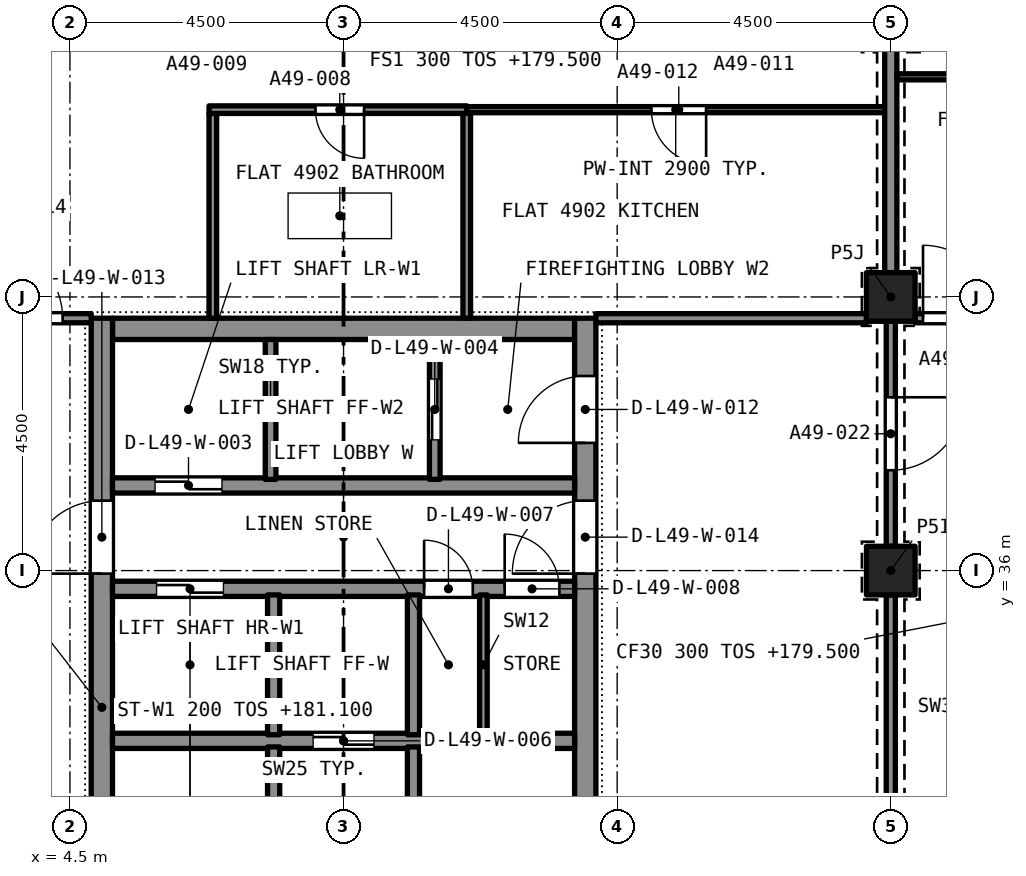
"""IFC4 building model, lengths in metres.
Left out: names, types, materials, properties, quantities, classifications, styles, units other than length and angle.
Written with IfcOpenShell. Run it as: python <this file> out.ifc"""

import sys

from ifc_helpers import new_model, si_unit, direction, frame, frame_2d, origin, origin_2d, place, context, subcontext, project, spatial, rectangle, extrude, element, fill, save


model = new_model("IFC4")
c1 = context("Model", 3, precision=1e-05, world=origin(), true_north=direction((0.0, 1.0)))
c2 = subcontext(c1, "Body", "Model", "MODEL_VIEW")
j1 = project(units=[si_unit("LENGTHUNIT", "METRE"), si_unit("PLANEANGLEUNIT", "RADIAN")], contexts=[c1])
p1 = place(None, origin())
s1 = spatial("IfcSite", under=j1, at=p1, CompositionType="ELEMENT")
p2 = place(p1, origin())
s2 = spatial("IfcBuilding", under=s1, at=p2, CompositionType="ELEMENT")
p3 = place(p2, frame((0.0, 0.0, 179.5)))
s3 = spatial("IfcBuildingStorey", under=s2, at=p3, CompositionType="ELEMENT", Elevation=179.5)
for number, where, z_axis, x_axis in (
    (1, (18.0, 36.0, 0.0), (0.0, 0.0, 1.0), (1.0, 0.0, 0.0)),
    (2, (18.0, 40.5, 0.0), (0.0, 0.0, 1.0), (1.0, 0.0, 0.0)),
):
    element("IfcColumn", number, at=place(p3, frame(where, z_axis=z_axis, x_axis=x_axis)), inside=s3, PredefinedType="COLUMN", context=c2, shape_type="SweptSolid", body=[
        extrude(rectangle(XDim=0.8, YDim=0.8, at=origin_2d()), origin(), (0.0, 0.0, 1.0), 3.2),
    ])
p4 = place(p3, frame((5.2, 39.975, 0.0), z_axis=(0.0, 0.0, 1.0), x_axis=(1.0, 0.0, 0.0)))
e3 = element("IfcWall", 3, at=p4, inside=s3, PredefinedType="SOLIDWALL", context=c2, shape_type="SweptSolid", body=[
    extrude(rectangle(XDim=7.6, YDim=0.35, at=frame_2d((3.8, 0.0))), origin(), (0.0, 0.0, 1.0), 3.2),
])
p5 = place(p3, frame((5.025, 27.35, 0.0), z_axis=(0.0, 0.0, 1.0), x_axis=(0.0, 1.0, 0.0)))
e4 = element("IfcWall", 4, at=p5, inside=s3, PredefinedType="SOLIDWALL", context=c2, shape_type="SweptSolid", body=[
    extrude(rectangle(XDim=12.8, YDim=0.35, at=frame_2d((6.4, 0.0))), origin(), (0.0, 0.0, 1.0), 3.2),
])
p6 = place(p5, frame((8.6, 0.0, 0.0)))
e5 = element("IfcOpeningElement", 5, at=p6, cuts=e4, PredefinedType="OPENING", context=c2, shape_type="SweptSolid", body=[
    extrude(rectangle(XDim=1.2, YDim=2.1, at=frame_2d((0.6, 1.05))), frame((0.0, 0.185, 0.0), z_axis=(0.0, -1.0, 0.0), x_axis=(1.0, 0.0, 0.0)), (0.0, 0.0, 1.0), 0.37),
])
p7 = place(p3, frame((12.975, 27.35, 0.0), z_axis=(0.0, 0.0, 1.0), x_axis=(0.0, 1.0, 0.0)))
e6 = element("IfcWall", 6, at=p7, inside=s3, PredefinedType="SOLIDWALL", context=c2, shape_type="SweptSolid", body=[
    extrude(rectangle(XDim=12.8, YDim=0.35, at=frame_2d((6.4, 0.0))), origin(), (0.0, 0.0, 1.0), 3.2),
])
p8 = place(p7, frame((10.75, 0.0, 0.0)))
e7 = element("IfcOpeningElement", 7, at=p8, cuts=e6, PredefinedType="OPENING", context=c2, shape_type="SweptSolid", body=[
    extrude(rectangle(XDim=1.1, YDim=2.1, at=frame_2d((0.55, 1.05))), frame((0.0, 0.185, 0.0), z_axis=(0.0, -1.0, 0.0), x_axis=(1.0, 0.0, 0.0)), (0.0, 0.0, 1.0), 0.37),
])
p9 = place(p7, frame((8.6, 0.0, 0.0)))
e8 = element("IfcOpeningElement", 8, at=p9, cuts=e6, PredefinedType="OPENING", context=c2, shape_type="SweptSolid", body=[
    extrude(rectangle(XDim=1.2, YDim=2.1, at=frame_2d((0.6, 1.05))), frame((0.0, 0.185, 0.0), z_axis=(0.0, -1.0, 0.0), x_axis=(1.0, 0.0, 0.0)), (0.0, 0.0, 1.0), 0.37),
])
p10 = place(p3, frame((6.85, 40.15, 0.0), z_axis=(0.0, 0.0, 1.0), x_axis=(0.0, 1.0, 0.0)))
e9 = element("IfcWall", 9, at=p10, inside=s3, PredefinedType="PARTITIONING", context=c2, shape_type="SweptSolid", body=[
    extrude(rectangle(XDim=3.368, YDim=0.125, at=frame_2d((1.684, 0.0))), origin(), (0.0, 0.0, 1.0), 2.9),
])
p11 = place(p3, frame((11.026, 43.58, 0.0), z_axis=(0.0, 0.0, 1.0), x_axis=(-1.0, 0.0, 0.0)))
e10 = element("IfcWall", 10, at=p11, inside=s3, PredefinedType="PARTITIONING", context=c2, shape_type="SweptSolid", body=[
    extrude(rectangle(XDim=4.239, YDim=0.125, at=frame_2d((2.119, 0.0))), origin(), (0.0, 0.0, 1.0), 2.9),
])
p12 = place(p11, frame((1.688, 0.0, 0.0)))
e11 = element("IfcOpeningElement", 11, at=p12, cuts=e10, PredefinedType="OPENING", context=c2, shape_type="SweptSolid", body=[
    extrude(rectangle(XDim=0.8, YDim=2.1, at=frame_2d((0.4, 1.05))), frame((0.0, 0.073, 0.0), z_axis=(0.0, -1.0, 0.0), x_axis=(1.0, 0.0, 0.0)), (0.0, 0.0, 1.0), 0.145),
])
p13 = place(p3, frame((11.026, 40.15, 0.0), z_axis=(0.0, 0.0, 1.0), x_axis=(0.0, 1.0, 0.0)))
e12 = element("IfcWall", 12, at=p13, inside=s3, PredefinedType="PARTITIONING", context=c2, shape_type="SweptSolid", body=[
    extrude(rectangle(XDim=3.368, YDim=0.125, at=frame_2d((1.684, 0.0))), origin(), (0.0, 0.0, 1.0), 2.9),
])
p14 = place(p3, frame((17.9, 43.58, 0.0), z_axis=(0.0, 0.0, 1.0), x_axis=(-1.0, 0.0, 0.0)))
e13 = element("IfcWall", 13, at=p14, inside=s3, PredefinedType="PARTITIONING", context=c2, shape_type="SweptSolid", body=[
    extrude(rectangle(XDim=6.874, YDim=0.1, at=frame_2d((3.437, 0.0))), origin(), (0.0, 0.0, 1.0), 2.9),
])
p15 = place(p14, frame((2.937, 0.0, 0.0)))
e14 = element("IfcOpeningElement", 14, at=p15, cuts=e13, PredefinedType="OPENING", context=c2, shape_type="SweptSolid", body=[
    extrude(rectangle(XDim=0.9, YDim=2.1, at=frame_2d((0.45, 1.05))), frame((0.0, 0.06, 0.0), z_axis=(0.0, -1.0, 0.0), x_axis=(1.0, 0.0, 0.0)), (0.0, 0.0, 1.0), 0.12),
])
p16 = place(p3, frame((3.05, 40.15, 0.0), z_axis=(0.0, 0.0, 1.0), x_axis=(1.0, 0.0, 0.0)))
e15 = element("IfcWall", 15, at=p16, inside=s3, PredefinedType="PARTITIONING", context=c2, shape_type="SweptSolid", body=[
    extrude(rectangle(XDim=1.8, YDim=0.15, at=frame_2d((0.9, 0.0))), origin(), (0.0, 0.0, 1.0), 2.9),
])
p17 = place(p16, frame((0.13, 0.0, 0.0)))
e16 = element("IfcOpeningElement", 16, at=p17, cuts=e15, PredefinedType="OPENING", context=c2, shape_type="SweptSolid", body=[
    extrude(rectangle(XDim=1.2, YDim=2.4, at=frame_2d((0.6, 1.2))), frame((0.0, 0.085, 0.0), z_axis=(0.0, -1.0, 0.0), x_axis=(1.0, 0.0, 0.0)), (0.0, 0.0, 1.0), 0.17),
])
p18 = place(p3, frame((18.0, 40.9, 0.0), z_axis=(0.0, 0.0, 1.0), x_axis=(0.0, 1.0, 0.0)))
e17 = element("IfcWall", 17, at=p18, inside=s3, PredefinedType="PARTITIONING", context=c2, shape_type="SweptSolid", body=[
    extrude(rectangle(XDim=3.7, YDim=0.2, at=frame_2d((1.85, 0.0))), origin(), (0.0, 0.0, 1.0), 2.38),
])
p19 = place(p3, frame((13.15, 40.15, 0.0), z_axis=(0.0, 0.0, 1.0), x_axis=(1.0, 0.0, 0.0)))
e18 = element("IfcWall", 18, at=p19, inside=s3, PredefinedType="PARTITIONING", context=c2, shape_type="SweptSolid", body=[
    extrude(rectangle(XDim=4.45, YDim=0.15, at=frame_2d((2.225, 0.0))), origin(), (0.0, 0.0, 1.0), 2.9),
])
p20 = place(p3, frame((18.1, 44.12, 0.0), z_axis=(0.0, 0.0, 1.0), x_axis=(1.0, 0.0, 0.0)))
e19 = element("IfcWall", 19, at=p20, inside=s3, PredefinedType="PARTITIONING", context=c2, shape_type="SweptSolid", body=[
    extrude(rectangle(XDim=4.4, YDim=0.1, at=frame_2d((2.2, 0.0))), origin(), (0.0, 0.0, 1.0), 2.75),
])
p21 = place(p20, frame((1.7, 0.0, 0.0)))
e20 = element("IfcOpeningElement", 20, at=p21, cuts=e19, PredefinedType="OPENING", context=c2, shape_type="SweptSolid", body=[
    extrude(rectangle(XDim=0.9, YDim=2.1, at=frame_2d((0.45, 1.05))), frame((0.0, 0.06, 0.0), z_axis=(0.0, -1.0, 0.0), x_axis=(1.0, 0.0, 0.0)), (0.0, 0.0, 1.0), 0.12),
])
p22 = place(p3, frame((18.4, 40.15, 0.0), z_axis=(0.0, 0.0, 1.0), x_axis=(1.0, 0.0, 0.0)))
e21 = element("IfcWall", 21, at=p22, inside=s3, PredefinedType="PARTITIONING", context=c2, shape_type="SweptSolid", body=[
    extrude(rectangle(XDim=1.95, YDim=0.15, at=frame_2d((0.975, 0.0))), origin(), (0.0, 0.0, 1.0), 2.75),
])
p23 = place(p22, frame((0.13, 0.0, 0.0)))
e22 = element("IfcOpeningElement", 22, at=p23, cuts=e21, PredefinedType="OPENING", context=c2, shape_type="SweptSolid", body=[
    extrude(rectangle(XDim=1.2, YDim=2.4, at=frame_2d((0.6, 1.2))), frame((0.0, 0.085, 0.0), z_axis=(0.0, -1.0, 0.0), x_axis=(1.0, 0.0, 0.0)), (0.0, 0.0, 1.0), 0.17),
])
p24 = place(p3, frame((18.0, 31.9, 0.0), z_axis=(0.0, 0.0, 1.0), x_axis=(0.0, 1.0, 0.0)))
e23 = element("IfcWall", 23, at=p24, inside=s3, PredefinedType="PARTITIONING", context=c2, shape_type="SweptSolid", body=[
    extrude(rectangle(XDim=3.7, YDim=0.15, at=frame_2d((1.85, 0.0))), origin(), (0.0, 0.0, 1.0), 2.38),
])
p25 = place(p3, frame((18.0, 40.1, 0.0), z_axis=(0.0, 0.0, 1.0), x_axis=(0.0, -1.0, 0.0)))
e24 = element("IfcWall", 24, at=p25, inside=s3, PredefinedType="PARTITIONING", context=c2, shape_type="SweptSolid", body=[
    extrude(rectangle(XDim=3.7, YDim=0.15, at=frame_2d((1.85, 0.0))), origin(), (0.0, 0.0, 1.0), 2.38),
])
p26 = place(p25, frame((1.25, 0.0, 0.0)))
e25 = element("IfcOpeningElement", 25, at=p26, cuts=e24, PredefinedType="OPENING", context=c2, shape_type="SweptSolid", body=[
    extrude(rectangle(XDim=1.2, YDim=2.1, at=frame_2d((0.6, 1.05))), frame((0.0, 0.085, 0.0), z_axis=(0.0, -1.0, 0.0), x_axis=(1.0, 0.0, 0.0)), (0.0, 0.0, 1.0), 0.17),
])
p27 = place(p3, frame((5.2, 33.2, 0.0), z_axis=(0.0, 0.0, 1.0), x_axis=(1.0, 0.0, 0.0)))
e26 = element("IfcWall", 26, at=p27, inside=s3, PredefinedType="SOLIDWALL", context=c2, shape_type="SweptSolid", body=[
    extrude(rectangle(XDim=7.6, YDim=0.25, at=frame_2d((3.8, 0.0))), origin(), (0.0, 0.0, 1.0), 2.9),
])
p28 = place(p27, frame((3.3, 0.0, 0.0)))
e27 = element("IfcOpeningElement", 27, at=p28, cuts=e26, PredefinedType="OPENING", context=c2, shape_type="SweptSolid", body=[
    extrude(rectangle(XDim=1.0, YDim=2.1, at=frame_2d((0.5, 1.05))), frame((0.0, 0.135, 0.0), z_axis=(0.0, -1.0, 0.0), x_axis=(1.0, 0.0, 0.0)), (0.0, 0.0, 1.0), 0.27),
])
p29 = place(p3, frame((5.2, 35.7, 0.0), z_axis=(0.0, 0.0, 1.0), x_axis=(1.0, 0.0, 0.0)))
e28 = element("IfcWall", 28, at=p29, inside=s3, PredefinedType="SOLIDWALL", context=c2, shape_type="SweptSolid", body=[
    extrude(rectangle(XDim=7.6, YDim=0.25, at=frame_2d((3.8, 0.0))), origin(), (0.0, 0.0, 1.0), 2.9),
])
p30 = place(p29, frame((0.725, 0.0, 0.0)))
e29 = element("IfcOpeningElement", 29, at=p30, cuts=e28, PredefinedType="OPENING", context=c2, shape_type="SweptSolid", body=[
    extrude(rectangle(XDim=1.1, YDim=2.4, at=frame_2d((0.55, 1.2))), frame((0.0, 0.135, 0.0), z_axis=(0.0, -1.0, 0.0), x_axis=(1.0, 0.0, 0.0)), (0.0, 0.0, 1.0), 0.27),
])
p31 = place(p29, frame((5.125, 0.0, 0.0)))
e30 = element("IfcOpeningElement", 30, at=p31, cuts=e28, PredefinedType="OPENING", context=c2, shape_type="SweptSolid", body=[
    extrude(rectangle(XDim=0.8, YDim=2.1, at=frame_2d((0.4, 1.05))), frame((0.0, 0.135, 0.0), z_axis=(0.0, -1.0, 0.0), x_axis=(1.0, 0.0, 0.0)), (0.0, 0.0, 1.0), 0.27),
])
p32 = place(p29, frame((6.45, 0.0, 0.0)))
e31 = element("IfcOpeningElement", 31, at=p32, cuts=e28, PredefinedType="OPENING", context=c2, shape_type="SweptSolid", body=[
    extrude(rectangle(XDim=0.9, YDim=2.1, at=frame_2d((0.45, 1.05))), frame((0.0, 0.135, 0.0), z_axis=(0.0, -1.0, 0.0), x_axis=(1.0, 0.0, 0.0)), (0.0, 0.0, 1.0), 0.27),
])
p33 = place(p3, frame((5.2, 37.4, 0.0), z_axis=(0.0, 0.0, 1.0), x_axis=(1.0, 0.0, 0.0)))
e32 = element("IfcWall", 32, at=p33, inside=s3, PredefinedType="SOLIDWALL", context=c2, shape_type="SweptSolid", body=[
    extrude(rectangle(XDim=7.6, YDim=0.25, at=frame_2d((3.8, 0.0))), origin(), (0.0, 0.0, 1.0), 2.9),
])
p34 = place(p33, frame((0.7, 0.0, 0.0)))
e33 = element("IfcOpeningElement", 33, at=p34, cuts=e32, PredefinedType="OPENING", context=c2, shape_type="SweptSolid", body=[
    extrude(rectangle(XDim=1.1, YDim=2.4, at=frame_2d((0.55, 1.2))), frame((0.0, 0.135, 0.0), z_axis=(0.0, -1.0, 0.0), x_axis=(1.0, 0.0, 0.0)), (0.0, 0.0, 1.0), 0.27),
])
p35 = place(p3, frame((7.85, 27.7, 0.0), z_axis=(0.0, 0.0, 1.0), x_axis=(0.0, 1.0, 0.0)))
e34 = element("IfcWall", 34, at=p35, inside=s3, PredefinedType="SOLIDWALL", context=c2, shape_type="SweptSolid", body=[
    extrude(rectangle(XDim=5.4, YDim=0.2, at=frame_2d((2.7, 0.0))), origin(), (0.0, 0.0, 1.0), 2.9),
])
p36 = place(p35, frame((0.2, 0.0, 0.0)))
e35 = element("IfcOpeningElement", 35, at=p36, cuts=e34, PredefinedType="OPENING", context=c2, shape_type="SweptSolid", body=[
    extrude(rectangle(XDim=0.9, YDim=2.1, at=frame_2d((0.45, 1.05))), frame((0.0, 0.11, 0.0), z_axis=(0.0, -1.0, 0.0), x_axis=(1.0, 0.0, 0.0)), (0.0, 0.0, 1.0), 0.22),
])
p37 = place(p3, frame((10.15, 27.7, 0.0), z_axis=(0.0, 0.0, 1.0), x_axis=(0.0, 1.0, 0.0)))
e36 = element("IfcWall", 36, at=p37, inside=s3, PredefinedType="SOLIDWALL", context=c2, shape_type="SweptSolid", body=[
    extrude(rectangle(XDim=5.4, YDim=0.2, at=frame_2d((2.7, 0.0))), origin(), (0.0, 0.0, 1.0), 2.9),
])
p38 = place(p37, frame((0.2, 0.0, 0.0)))
e37 = element("IfcOpeningElement", 37, at=p38, cuts=e36, PredefinedType="OPENING", context=c2, shape_type="SweptSolid", body=[
    extrude(rectangle(XDim=0.9, YDim=2.1, at=frame_2d((0.45, 1.05))), frame((0.0, 0.11, 0.0), z_axis=(0.0, -1.0, 0.0), x_axis=(1.0, 0.0, 0.0)), (0.0, 0.0, 1.0), 0.22),
])
for number, where, z_axis, x_axis in (
    (38, (7.85, 33.3, 0.0), (0.0, 0.0, 1.0), (0.0, 1.0, 0.0)),
    (39, (10.15, 33.3, 0.0), (0.0, 0.0, 1.0), (0.0, 1.0, 0.0)),
):
    element("IfcWall", number, at=place(p3, frame(where, z_axis=z_axis, x_axis=x_axis)), inside=s3, PredefinedType="SOLIDWALL", context=c2, shape_type="SweptSolid", body=[
        extrude(rectangle(XDim=2.3, YDim=0.2, at=frame_2d((1.15, 0.0))), origin(), (0.0, 0.0, 1.0), 2.9),
    ])
p39 = place(p3, frame((7.8, 37.5, 0.0), z_axis=(0.0, 0.0, 1.0), x_axis=(0.0, 1.0, 0.0)))
e40 = element("IfcWall", 40, at=p39, inside=s3, PredefinedType="SOLIDWALL", context=c2, shape_type="SweptSolid", body=[
    extrude(rectangle(XDim=2.3, YDim=0.175, at=frame_2d((1.15, 0.0))), origin(), (0.0, 0.0, 1.0), 2.9),
])
p40 = place(p3, frame((10.5, 37.5, 0.0), z_axis=(0.0, 0.0, 1.0), x_axis=(0.0, 1.0, 0.0)))
e41 = element("IfcWall", 41, at=p40, inside=s3, PredefinedType="SOLIDWALL", context=c2, shape_type="SweptSolid", body=[
    extrude(rectangle(XDim=2.3, YDim=0.175, at=frame_2d((1.15, 0.0))), origin(), (0.0, 0.0, 1.0), 2.9),
])
p41 = place(p40, frame((0.65, 0.0, 0.0)))
e42 = element("IfcOpeningElement", 42, at=p41, cuts=e41, PredefinedType="OPENING", context=c2, shape_type="SweptSolid", body=[
    extrude(rectangle(XDim=1.0, YDim=2.1, at=frame_2d((0.5, 1.05))), frame((0.0, 0.097, 0.0), z_axis=(0.0, -1.0, 0.0), x_axis=(1.0, 0.0, 0.0)), (0.0, 0.0, 1.0), 0.195),
])
p42 = place(p3, frame((11.3, 33.3, 0.0), z_axis=(0.0, 0.0, 1.0), x_axis=(0.0, 1.0, 0.0)))
e43 = element("IfcWall", 43, at=p42, inside=s3, PredefinedType="PARTITIONING", context=c2, shape_type="SweptSolid", body=[
    extrude(rectangle(XDim=2.3, YDim=0.125, at=frame_2d((1.15, 0.0))), origin(), (0.0, 0.0, 1.0), 2.9),
])
p43 = place(p12, origin())
e44 = element("IfcDoor", 44, at=p43, inside=s3, OperationType="SINGLE_SWING_LEFT", PredefinedType="DOOR", context=c2, shape_type="SweptSolid", body=[
    extrude(rectangle(XDim=0.8, YDim=2.1, at=frame_2d((0.4, 1.05))), frame((0.0, 0.025, 0.0), z_axis=(0.0, -1.0, 0.0), x_axis=(1.0, 0.0, 0.0)), (0.0, 0.0, 1.0), 0.05),
])
fill(e11, e44)
p44 = place(p15, origin())
e45 = element("IfcDoor", 45, at=p44, inside=s3, OperationType="SINGLE_SWING_LEFT", PredefinedType="DOOR", context=c2, shape_type="SweptSolid", body=[
    extrude(rectangle(XDim=0.9, YDim=2.1, at=frame_2d((0.45, 1.05))), frame((0.0, 0.025, 0.0), z_axis=(0.0, -1.0, 0.0), x_axis=(1.0, 0.0, 0.0)), (0.0, 0.0, 1.0), 0.05),
])
fill(e14, e45)
p45 = place(p17, origin())
e46 = element("IfcDoor", 46, at=p45, inside=s3, OperationType="SINGLE_SWING_LEFT", PredefinedType="DOOR", context=c2, shape_type="SweptSolid", body=[
    extrude(rectangle(XDim=1.2, YDim=2.4, at=frame_2d((0.6, 1.2))), frame((0.0, 0.025, 0.0), z_axis=(0.0, -1.0, 0.0), x_axis=(1.0, 0.0, 0.0)), (0.0, 0.0, 1.0), 0.05),
])
fill(e16, e46)
p46 = place(p23, origin())
e47 = element("IfcDoor", 47, at=p46, inside=s3, OperationType="SINGLE_SWING_LEFT", PredefinedType="DOOR", context=c2, shape_type="SweptSolid", body=[
    extrude(rectangle(XDim=1.2, YDim=2.4, at=frame_2d((0.6, 1.2))), frame((0.0, 0.025, 0.0), z_axis=(0.0, -1.0, 0.0), x_axis=(1.0, 0.0, 0.0)), (0.0, 0.0, 1.0), 0.05),
])
fill(e22, e47)
p47 = place(p26, origin())
e48 = element("IfcDoor", 48, at=p47, inside=s3, OperationType="SINGLE_SWING_LEFT", PredefinedType="DOOR", context=c2, shape_type="SweptSolid", body=[
    extrude(rectangle(XDim=1.2, YDim=2.1, at=frame_2d((0.6, 1.05))), frame((0.0, 0.025, 0.0), z_axis=(0.0, -1.0, 0.0), x_axis=(1.0, 0.0, 0.0)), (0.0, 0.0, 1.0), 0.05),
])
fill(e25, e48)
p48 = place(p34, origin())
e49 = element("IfcDoor", 49, at=p48, inside=s3, OperationType="SLIDING_TO_LEFT", PredefinedType="DOOR", context=c2, shape_type="SweptSolid", body=[
    extrude(rectangle(XDim=1.1, YDim=2.4, at=frame_2d((0.55, 1.2))), frame((0.0, 0.025, 0.0), z_axis=(0.0, -1.0, 0.0), x_axis=(1.0, 0.0, 0.0)), (0.0, 0.0, 1.0), 0.05),
])
fill(e33, e49)
p49 = place(p41, origin())
e50 = element("IfcDoor", 50, at=p49, inside=s3, OperationType="SLIDING_TO_LEFT", PredefinedType="DOOR", context=c2, shape_type="SweptSolid", body=[
    extrude(rectangle(XDim=1.0, YDim=2.1, at=frame_2d((0.5, 1.05))), frame((0.0, 0.025, 0.0), z_axis=(0.0, -1.0, 0.0), x_axis=(1.0, 0.0, 0.0)), (0.0, 0.0, 1.0), 0.05),
])
fill(e42, e50)
p50 = place(p30, origin())
e51 = element("IfcDoor", 51, at=p50, inside=s3, OperationType="SLIDING_TO_LEFT", PredefinedType="DOOR", context=c2, shape_type="SweptSolid", body=[
    extrude(rectangle(XDim=1.1, YDim=2.4, at=frame_2d((0.55, 1.2))), frame((0.0, 0.025, 0.0), z_axis=(0.0, -1.0, 0.0), x_axis=(1.0, 0.0, 0.0)), (0.0, 0.0, 1.0), 0.05),
])
fill(e29, e51)
p51 = place(p28, origin())
e52 = element("IfcDoor", 52, at=p51, inside=s3, OperationType="SLIDING_TO_LEFT", PredefinedType="DOOR", context=c2, shape_type="SweptSolid", body=[
    extrude(rectangle(XDim=1.0, YDim=2.1, at=frame_2d((0.5, 1.05))), frame((0.0, 0.025, 0.0), z_axis=(0.0, -1.0, 0.0), x_axis=(1.0, 0.0, 0.0)), (0.0, 0.0, 1.0), 0.05),
])
fill(e27, e52)
p52 = place(p31, origin())
e53 = element("IfcDoor", 53, at=p52, inside=s3, OperationType="SINGLE_SWING_LEFT", PredefinedType="DOOR", context=c2, shape_type="SweptSolid", body=[
    extrude(rectangle(XDim=0.8, YDim=2.1, at=frame_2d((0.4, 1.05))), frame((0.0, 0.025, 0.0), z_axis=(0.0, -1.0, 0.0), x_axis=(1.0, 0.0, 0.0)), (0.0, 0.0, 1.0), 0.05),
])
fill(e30, e53)
p53 = place(p32, origin())
e54 = element("IfcDoor", 54, at=p53, inside=s3, OperationType="SINGLE_SWING_LEFT", PredefinedType="DOOR", context=c2, shape_type="SweptSolid", body=[
    extrude(rectangle(XDim=0.9, YDim=2.1, at=frame_2d((0.45, 1.05))), frame((0.0, 0.025, 0.0), z_axis=(0.0, -1.0, 0.0), x_axis=(1.0, 0.0, 0.0)), (0.0, 0.0, 1.0), 0.05),
])
fill(e31, e54)
p54 = place(p8, origin())
e55 = element("IfcDoor", 55, at=p54, inside=s3, OperationType="SINGLE_SWING_LEFT", PredefinedType="DOOR", context=c2, shape_type="SweptSolid", body=[
    extrude(rectangle(XDim=1.1, YDim=2.1, at=frame_2d((0.55, 1.05))), frame((0.0, 0.025, 0.0), z_axis=(0.0, -1.0, 0.0), x_axis=(1.0, 0.0, 0.0)), (0.0, 0.0, 1.0), 0.05),
])
fill(e7, e55)
p55 = place(p6, origin())
e56 = element("IfcDoor", 56, at=p55, inside=s3, OperationType="SINGLE_SWING_LEFT", PredefinedType="DOOR", context=c2, shape_type="SweptSolid", body=[
    extrude(rectangle(XDim=1.2, YDim=2.1, at=frame_2d((0.6, 1.05))), frame((0.0, 0.025, 0.0), z_axis=(0.0, -1.0, 0.0), x_axis=(1.0, 0.0, 0.0)), (0.0, 0.0, 1.0), 0.05),
])
fill(e5, e56)
p56 = place(p9, origin())
e57 = element("IfcDoor", 57, at=p56, inside=s3, OperationType="SINGLE_SWING_LEFT", PredefinedType="DOOR", context=c2, shape_type="SweptSolid", body=[
    extrude(rectangle(XDim=1.2, YDim=2.1, at=frame_2d((0.6, 1.05))), frame((0.0, 0.025, 0.0), z_axis=(0.0, -1.0, 0.0), x_axis=(1.0, 0.0, 0.0)), (0.0, 0.0, 1.0), 0.05),
])
fill(e8, e57)
save(model, sys.argv[1])
